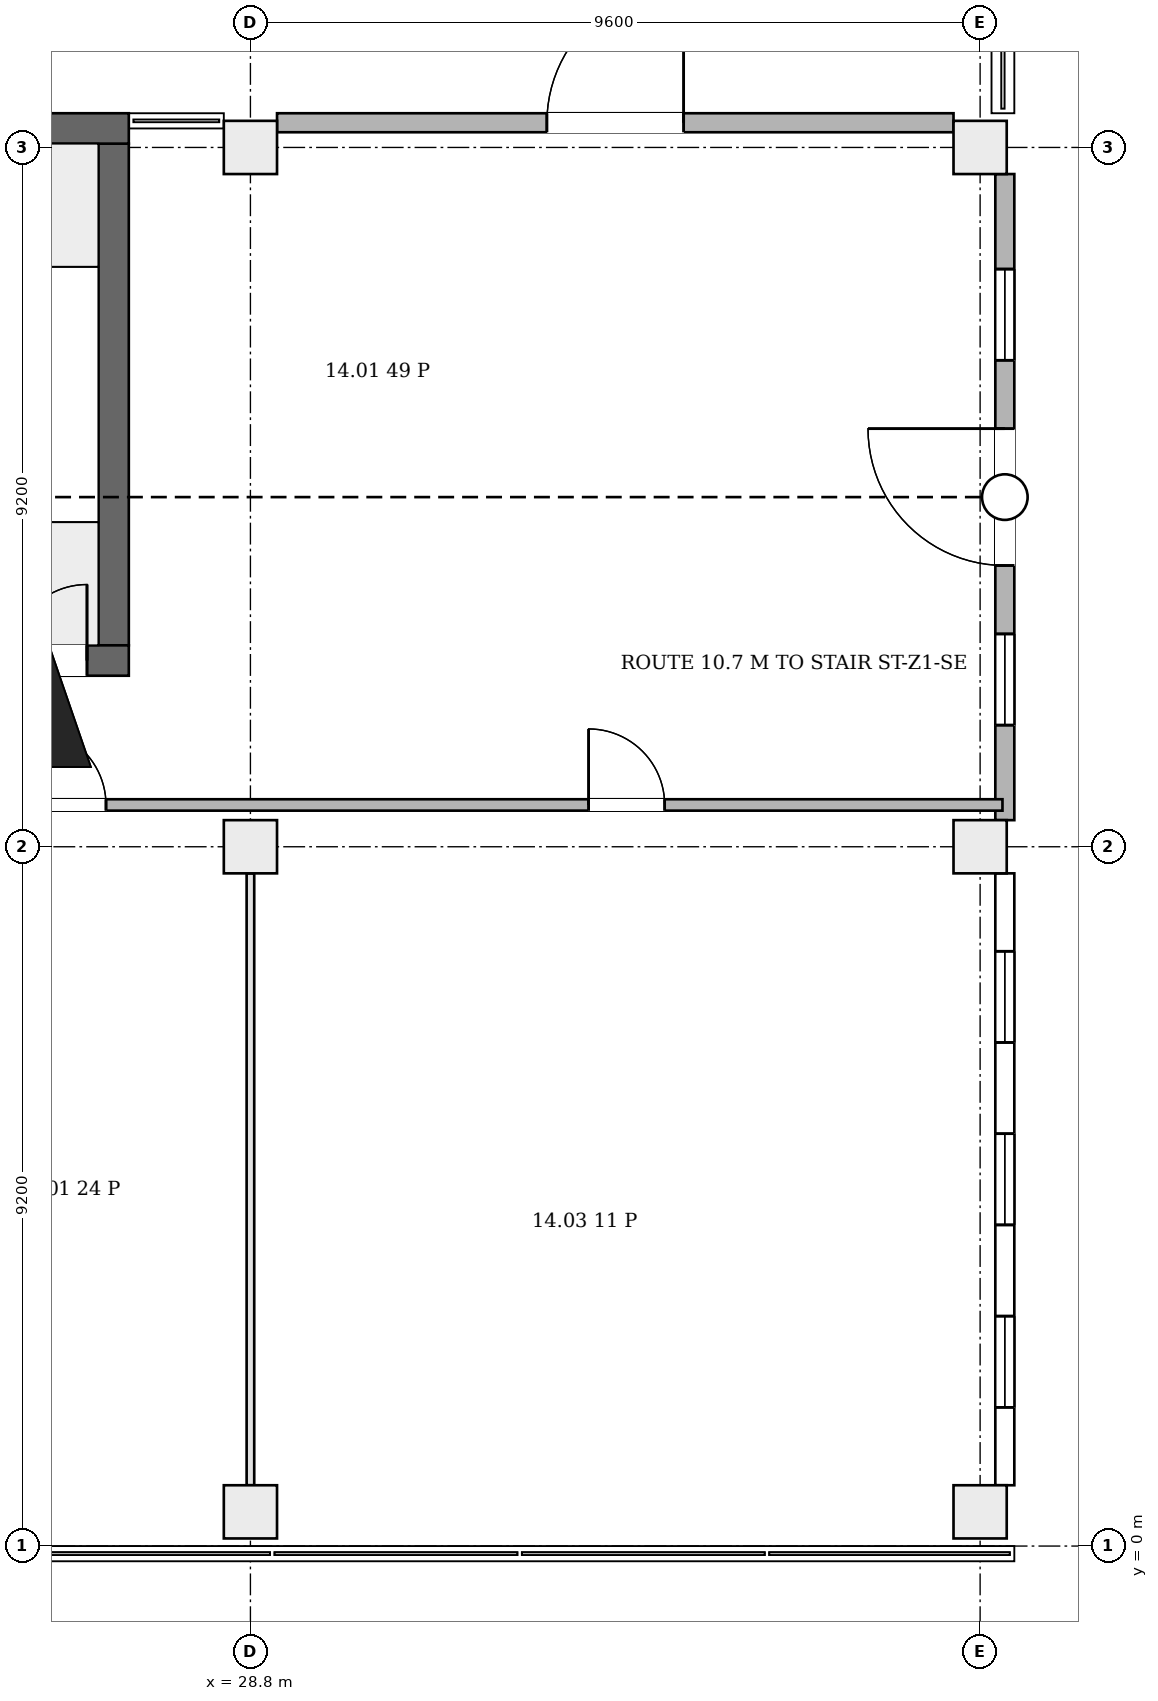
"""IFC4 building model, lengths in metres.
Left out: names, types, materials, properties, quantities, classifications, styles, units other than length and angle.
Written with IfcOpenShell. Run it as: python <this file> out.ifc"""

import sys

from ifc_helpers import new_model, si_unit, direction, frame, frame_2d, origin, origin_2d, place, context, subcontext, project, spatial, rectangle, extrude, element, fill, save


model = new_model("IFC4")
c1 = context("Model", 3, precision=1e-05, world=origin(), true_north=direction((0.0, 1.0)))
c2 = subcontext(c1, "Body", "Model", "MODEL_VIEW")
j1 = project(units=[si_unit("LENGTHUNIT", "METRE"), si_unit("PLANEANGLEUNIT", "RADIAN")], contexts=[c1])
p1 = place(None, origin())
s1 = spatial("IfcSite", under=j1, at=p1, CompositionType="ELEMENT")
p2 = place(p1, origin())
s2 = spatial("IfcBuilding", under=s1, at=p2, CompositionType="ELEMENT")
p3 = place(p2, frame((0.0, 0.0, 69.7)))
s3 = spatial("IfcBuildingStorey", under=s2, at=p3, CompositionType="ELEMENT", Elevation=69.7)
p4 = place(p3, frame((23.0, 11.65, 0.0), z_axis=(0.0, 0.0, 1.0), x_axis=(1.0, 0.0, 0.0)))
e1 = element("IfcWall", 1, at=p4, inside=s3, PredefinedType="SHEAR", context=c2, shape_type="SweptSolid", body=[
    extrude(rectangle(XDim=4.2, YDim=0.4, at=frame_2d((2.1, 0.0))), origin(), (0.0, 0.0, 1.0), 4.2),
])
p5 = place(p4, frame((0.55, 0.0, 0.0)))
e2 = element("IfcOpeningElement", 2, at=p5, cuts=e1, PredefinedType="OPENING", context=c2, shape_type="SweptSolid", body=[
    extrude(rectangle(XDim=1.0, YDim=2.1, at=frame_2d((0.5, 1.05))), frame((0.0, 0.21, 0.0), z_axis=(0.0, -1.0, 0.0), x_axis=(1.0, 0.0, 0.0)), (0.0, 0.0, 1.0), 0.42),
])
p6 = place(p4, frame((2.65, 0.0, 0.0)))
e3 = element("IfcOpeningElement", 3, at=p6, cuts=e1, PredefinedType="OPENING", context=c2, shape_type="SweptSolid", body=[
    extrude(rectangle(XDim=1.0, YDim=2.1, at=frame_2d((0.5, 1.05))), frame((0.0, 0.21, 0.0), z_axis=(0.0, -1.0, 0.0), x_axis=(1.0, 0.0, 0.0)), (0.0, 0.0, 1.0), 0.42),
])
p7 = place(p3, frame((23.0, 18.65, 0.0), z_axis=(0.0, 0.0, 1.0), x_axis=(1.0, 0.0, 0.0)))
e4 = element("IfcWall", 4, at=p7, inside=s3, PredefinedType="SHEAR", context=c2, shape_type="SweptSolid", body=[
    extrude(rectangle(XDim=4.2, YDim=0.4, at=frame_2d((2.1, 0.0))), origin(), (0.0, 0.0, 1.0), 4.2),
])
p8 = place(p3, frame((27.0, 11.85, 0.0), z_axis=(0.0, 0.0, 1.0), x_axis=(0.0, 1.0, 0.0)))
e5 = element("IfcWall", 5, at=p8, inside=s3, PredefinedType="SHEAR", context=c2, shape_type="SweptSolid", body=[
    extrude(rectangle(XDim=6.6, YDim=0.4, at=frame_2d((3.3, 0.0))), origin(), (0.0, 0.0, 1.0), 4.2),
])
for number, where, z_axis, x_axis in (
    (6, (28.8, 0.45, 0.0), (0.0, 0.0, 1.0), (1.0, 0.0, 0.0)),
    (7, (38.4, 0.45, 0.0), (0.0, 0.0, 1.0), (1.0, 0.0, 0.0)),
    (8, (28.8, 9.2, 0.0), (0.0, 0.0, 1.0), (1.0, 0.0, 0.0)),
    (9, (38.4, 9.2, 0.0), (0.0, 0.0, 1.0), (1.0, 0.0, 0.0)),
    (10, (28.8, 18.4, 0.0), (0.0, 0.0, 1.0), (1.0, 0.0, 0.0)),
    (11, (38.4, 18.4, 0.0), (0.0, 0.0, 1.0), (1.0, 0.0, 0.0)),
):
    element("IfcColumn", number, at=place(p3, frame(where, z_axis=z_axis, x_axis=x_axis)), inside=s3, PredefinedType="COLUMN", context=c2, shape_type="SweptSolid", body=[
        extrude(rectangle(XDim=0.7, YDim=0.7, at=origin_2d()), origin(), (0.0, 0.0, 1.0), 4.2),
    ])
p9 = place(p3, frame((38.05, 18.725, 0.0), z_axis=(0.0, 0.0, 1.0), x_axis=(-1.0, 0.0, 0.0)))
e12 = element("IfcWall", 12, at=p9, inside=s3, PredefinedType="ELEMENTEDWALL", context=c2, shape_type="SweptSolid", body=[
    extrude(rectangle(XDim=8.9, YDim=0.25, at=frame_2d((4.45, 0.0))), origin(), (0.0, 0.0, 1.0), 3.9),
])
p10 = place(p9, frame((3.55, 0.0, 0.0)))
e13 = element("IfcOpeningElement", 13, at=p10, cuts=e12, PredefinedType="OPENING", context=c2, shape_type="SweptSolid", body=[
    extrude(rectangle(XDim=1.8, YDim=2.4, at=frame_2d((0.9, 1.2))), frame((0.0, 0.135, 0.0), z_axis=(0.0, -1.0, 0.0), x_axis=(1.0, 0.0, 0.0)), (0.0, 0.0, 1.0), 0.27),
])
p11 = place(p3, frame((38.725, 0.8, 0.0), z_axis=(0.0, 0.0, 1.0), x_axis=(0.0, 1.0, 0.0)))
e14 = element("IfcWall", 14, at=p11, inside=s3, PredefinedType="ELEMENTEDWALL", context=c2, shape_type="SweptSolid", body=[
    extrude(rectangle(XDim=8.05, YDim=0.25, at=frame_2d((4.025, 0.0))), origin(), (0.0, 0.0, 1.0), 3.9),
])
p12 = place(p11, frame((1.025, 0.0, 0.9)))
e15 = element("IfcOpeningElement", 15, at=p12, cuts=e14, PredefinedType="OPENING", context=c2, shape_type="SweptSolid", body=[
    extrude(rectangle(XDim=1.2, YDim=2.6, at=frame_2d((0.6, 1.3))), frame((0.0, 0.135, 0.0), z_axis=(0.0, -1.0, 0.0), x_axis=(1.0, 0.0, 0.0)), (0.0, 0.0, 1.0), 0.27),
])
p13 = place(p11, frame((3.425, 0.0, 0.9)))
e16 = element("IfcOpeningElement", 16, at=p13, cuts=e14, PredefinedType="OPENING", context=c2, shape_type="SweptSolid", body=[
    extrude(rectangle(XDim=1.2, YDim=2.6, at=frame_2d((0.6, 1.3))), frame((0.0, 0.135, 0.0), z_axis=(0.0, -1.0, 0.0), x_axis=(1.0, 0.0, 0.0)), (0.0, 0.0, 1.0), 0.27),
])
p14 = place(p11, frame((5.825, 0.0, 0.9)))
e17 = element("IfcOpeningElement", 17, at=p14, cuts=e14, PredefinedType="OPENING", context=c2, shape_type="SweptSolid", body=[
    extrude(rectangle(XDim=1.2, YDim=2.6, at=frame_2d((0.6, 1.3))), frame((0.0, 0.135, 0.0), z_axis=(0.0, -1.0, 0.0), x_axis=(1.0, 0.0, 0.0)), (0.0, 0.0, 1.0), 0.27),
])
p15 = place(p3, frame((38.725, 9.55, 0.0), z_axis=(0.0, 0.0, 1.0), x_axis=(0.0, 1.0, 0.0)))
e18 = element("IfcWall", 18, at=p15, inside=s3, PredefinedType="ELEMENTEDWALL", context=c2, shape_type="SweptSolid", body=[
    extrude(rectangle(XDim=8.5, YDim=0.25, at=frame_2d((4.25, 0.0))), origin(), (0.0, 0.0, 1.0), 3.9),
])
p16 = place(p15, frame((3.35, 0.0, 0.0)))
e19 = element("IfcOpeningElement", 19, at=p16, cuts=e18, PredefinedType="OPENING", context=c2, shape_type="SweptSolid", body=[
    extrude(rectangle(XDim=1.8, YDim=2.4, at=frame_2d((0.9, 1.2))), frame((0.0, 0.135, 0.0), z_axis=(0.0, -1.0, 0.0), x_axis=(1.0, 0.0, 0.0)), (0.0, 0.0, 1.0), 0.27),
])
p17 = place(p15, frame((1.25, 0.0, 0.9)))
e20 = element("IfcOpeningElement", 20, at=p17, cuts=e18, PredefinedType="OPENING", context=c2, shape_type="SweptSolid", body=[
    extrude(rectangle(XDim=1.2, YDim=2.6, at=frame_2d((0.6, 1.3))), frame((0.0, 0.135, 0.0), z_axis=(0.0, -1.0, 0.0), x_axis=(1.0, 0.0, 0.0)), (0.0, 0.0, 1.0), 0.27),
])
p18 = place(p15, frame((6.05, 0.0, 0.9)))
e21 = element("IfcOpeningElement", 21, at=p18, cuts=e18, PredefinedType="OPENING", context=c2, shape_type="SweptSolid", body=[
    extrude(rectangle(XDim=1.2, YDim=2.6, at=frame_2d((0.6, 1.3))), frame((0.0, 0.135, 0.0), z_axis=(0.0, -1.0, 0.0), x_axis=(1.0, 0.0, 0.0)), (0.0, 0.0, 1.0), 0.27),
])
p19 = place(p3, frame((4.325, 9.75, 0.0), z_axis=(0.0, 0.0, 1.0), x_axis=(1.0, 0.0, 0.0)))
e22 = element("IfcWall", 22, at=p19, inside=s3, PredefinedType="PARTITIONING", context=c2, shape_type="SweptSolid", body=[
    extrude(rectangle(XDim=34.369, YDim=0.15, at=frame_2d((17.185, 0.0))), origin(), (0.0, 0.0, 1.0), 3.9),
])
p20 = place(p19, frame((2.175, 0.0, 0.0)))
e23 = element("IfcOpeningElement", 23, at=p20, cuts=e22, PredefinedType="OPENING", context=c2, shape_type="SweptSolid", body=[
    extrude(rectangle(XDim=1.0, YDim=2.1, at=frame_2d((0.5, 1.05))), frame((0.0, 0.085, 0.0), z_axis=(0.0, -1.0, 0.0), x_axis=(1.0, 0.0, 0.0)), (0.0, 0.0, 1.0), 0.17),
])
p21 = place(p19, frame((11.975, 0.0, 0.0)))
e24 = element("IfcOpeningElement", 24, at=p21, cuts=e22, PredefinedType="OPENING", context=c2, shape_type="SweptSolid", body=[
    extrude(rectangle(XDim=1.0, YDim=2.1, at=frame_2d((0.5, 1.05))), frame((0.0, 0.085, 0.0), z_axis=(0.0, -1.0, 0.0), x_axis=(1.0, 0.0, 0.0)), (0.0, 0.0, 1.0), 0.17),
])
p22 = place(p19, frame((21.575, 0.0, 0.0)))
e25 = element("IfcOpeningElement", 25, at=p22, cuts=e22, PredefinedType="OPENING", context=c2, shape_type="SweptSolid", body=[
    extrude(rectangle(XDim=1.0, YDim=2.1, at=frame_2d((0.5, 1.05))), frame((0.0, 0.085, 0.0), z_axis=(0.0, -1.0, 0.0), x_axis=(1.0, 0.0, 0.0)), (0.0, 0.0, 1.0), 0.17),
])
p23 = place(p19, frame((28.925, 0.0, 0.0)))
e26 = element("IfcOpeningElement", 26, at=p23, cuts=e22, PredefinedType="OPENING", context=c2, shape_type="SweptSolid", body=[
    extrude(rectangle(XDim=1.0, YDim=2.1, at=frame_2d((0.5, 1.05))), frame((0.0, 0.085, 0.0), z_axis=(0.0, -1.0, 0.0), x_axis=(1.0, 0.0, 0.0)), (0.0, 0.0, 1.0), 0.17),
])
p24 = place(p3, frame((28.8, 0.8, 0.0), z_axis=(0.0, 0.0, 1.0), x_axis=(0.0, 1.0, 0.0)))
e27 = element("IfcWall", 27, at=p24, inside=s3, PredefinedType="PARTITIONING", context=c2, shape_type="SweptSolid", body=[
    extrude(rectangle(XDim=8.05, YDim=0.1, at=frame_2d((4.025, 0.0))), origin(), (0.0, 0.0, 1.0), 3.9),
])
p25 = place(p10, frame((1.8, 0.0, 0.0), z_axis=(0.0, 0.0, 1.0), x_axis=(-1.0, 0.0, 0.0)))
e28 = element("IfcDoor", 28, at=p25, inside=s3, OperationType="DOUBLE_DOOR_SINGLE_SWING", PredefinedType="DOOR", context=c2, shape_type="SweptSolid", body=[
    extrude(rectangle(XDim=1.8, YDim=2.4, at=frame_2d((0.9, 1.2))), frame((0.0, 0.025, 0.0), z_axis=(0.0, -1.0, 0.0), x_axis=(1.0, 0.0, 0.0)), (0.0, 0.0, 1.0), 0.05),
])
fill(e13, e28)
p26 = place(p12, origin())
e29 = element("IfcWindow", 29, at=p26, inside=s3, PartitioningType="SINGLE_PANEL", PredefinedType="WINDOW", context=c2, shape_type="SweptSolid", body=[
    extrude(rectangle(XDim=1.2, YDim=2.6, at=frame_2d((0.6, 1.3))), frame((0.0, 0.03, 0.0), z_axis=(0.0, -1.0, 0.0), x_axis=(1.0, 0.0, 0.0)), (0.0, 0.0, 1.0), 0.06),
])
fill(e15, e29)
p27 = place(p13, origin())
e30 = element("IfcWindow", 30, at=p27, inside=s3, PartitioningType="SINGLE_PANEL", PredefinedType="WINDOW", context=c2, shape_type="SweptSolid", body=[
    extrude(rectangle(XDim=1.2, YDim=2.6, at=frame_2d((0.6, 1.3))), frame((0.0, 0.03, 0.0), z_axis=(0.0, -1.0, 0.0), x_axis=(1.0, 0.0, 0.0)), (0.0, 0.0, 1.0), 0.06),
])
fill(e16, e30)
p28 = place(p14, origin())
e31 = element("IfcWindow", 31, at=p28, inside=s3, PartitioningType="SINGLE_PANEL", PredefinedType="WINDOW", context=c2, shape_type="SweptSolid", body=[
    extrude(rectangle(XDim=1.2, YDim=2.6, at=frame_2d((0.6, 1.3))), frame((0.0, 0.03, 0.0), z_axis=(0.0, -1.0, 0.0), x_axis=(1.0, 0.0, 0.0)), (0.0, 0.0, 1.0), 0.06),
])
fill(e17, e31)
p29 = place(p16, frame((1.8, 0.0, 0.0), z_axis=(0.0, 0.0, 1.0), x_axis=(-1.0, 0.0, 0.0)))
e32 = element("IfcDoor", 32, at=p29, inside=s3, OperationType="DOUBLE_DOOR_SINGLE_SWING", PredefinedType="DOOR", context=c2, shape_type="SweptSolid", body=[
    extrude(rectangle(XDim=1.8, YDim=2.4, at=frame_2d((0.9, 1.2))), frame((0.0, 0.025, 0.0), z_axis=(0.0, -1.0, 0.0), x_axis=(1.0, 0.0, 0.0)), (0.0, 0.0, 1.0), 0.05),
])
fill(e19, e32)
p30 = place(p17, origin())
e33 = element("IfcWindow", 33, at=p30, inside=s3, PartitioningType="SINGLE_PANEL", PredefinedType="WINDOW", context=c2, shape_type="SweptSolid", body=[
    extrude(rectangle(XDim=1.2, YDim=2.6, at=frame_2d((0.6, 1.3))), frame((0.0, 0.03, 0.0), z_axis=(0.0, -1.0, 0.0), x_axis=(1.0, 0.0, 0.0)), (0.0, 0.0, 1.0), 0.06),
])
fill(e20, e33)
p31 = place(p18, origin())
e34 = element("IfcWindow", 34, at=p31, inside=s3, PartitioningType="SINGLE_PANEL", PredefinedType="WINDOW", context=c2, shape_type="SweptSolid", body=[
    extrude(rectangle(XDim=1.2, YDim=2.6, at=frame_2d((0.6, 1.3))), frame((0.0, 0.03, 0.0), z_axis=(0.0, -1.0, 0.0), x_axis=(1.0, 0.0, 0.0)), (0.0, 0.0, 1.0), 0.06),
])
fill(e21, e34)
p32 = place(p6, origin())
e35 = element("IfcDoor", 35, at=p32, inside=s3, OperationType="SINGLE_SWING_LEFT", PredefinedType="DOOR", context=c2, shape_type="SweptSolid", body=[
    extrude(rectangle(XDim=1.0, YDim=2.1, at=frame_2d((0.5, 1.05))), frame((0.0, 0.025, 0.0), z_axis=(0.0, -1.0, 0.0), x_axis=(1.0, 0.0, 0.0)), (0.0, 0.0, 1.0), 0.05),
])
fill(e3, e35)
p33 = place(p22, origin())
e36 = element("IfcDoor", 36, at=p33, inside=s3, OperationType="SINGLE_SWING_LEFT", PredefinedType="DOOR", context=c2, shape_type="SweptSolid", body=[
    extrude(rectangle(XDim=1.0, YDim=2.1, at=frame_2d((0.5, 1.05))), frame((0.0, 0.025, 0.0), z_axis=(0.0, -1.0, 0.0), x_axis=(1.0, 0.0, 0.0)), (0.0, 0.0, 1.0), 0.05),
])
fill(e25, e36)
p34 = place(p23, origin())
e37 = element("IfcDoor", 37, at=p34, inside=s3, OperationType="SINGLE_SWING_LEFT", PredefinedType="DOOR", context=c2, shape_type="SweptSolid", body=[
    extrude(rectangle(XDim=1.0, YDim=2.1, at=frame_2d((0.5, 1.05))), frame((0.0, 0.025, 0.0), z_axis=(0.0, -1.0, 0.0), x_axis=(1.0, 0.0, 0.0)), (0.0, 0.0, 1.0), 0.05),
])
fill(e26, e37)
save(model, sys.argv[1])
